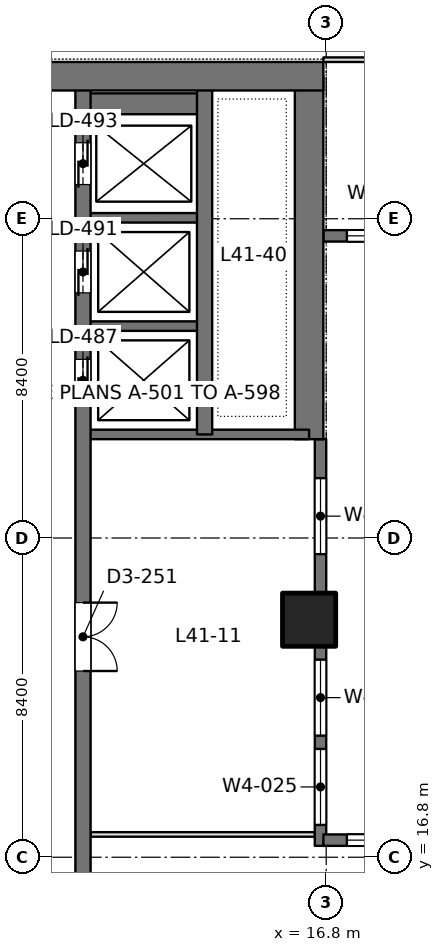
"""IFC4 building model, lengths in metres.
Left out: names, types, materials, properties, quantities, classifications, styles, units other than length and angle.
Written with IfcOpenShell. Run it as: python <this file> out.ifc"""

import sys

from ifc_helpers import new_model, si_unit, direction, frame, frame_2d, origin, origin_2d, place, context, subcontext, project, spatial, rectangle, extrude, element, fill, save


model = new_model("IFC4")
c1 = context("Model", 3, precision=1e-05, world=origin(), true_north=direction((0.0, 1.0)))
c2 = subcontext(c1, "Body", "Model", "MODEL_VIEW")
j1 = project(units=[si_unit("LENGTHUNIT", "METRE"), si_unit("PLANEANGLEUNIT", "RADIAN")], contexts=[c1])
p1 = place(None, origin())
s1 = spatial("IfcSite", under=j1, at=p1, CompositionType="ELEMENT")
p2 = place(p1, origin())
s2 = spatial("IfcBuilding", under=s1, at=p2, CompositionType="ELEMENT")
p3 = place(p2, frame((0.0, 0.0, 181.8)))
s3 = spatial("IfcBuildingStorey", under=s2, at=p3, CompositionType="ELEMENT", Elevation=181.8)
p4 = place(p3, frame((16.35, 23.05, 0.0), z_axis=(0.0, 0.0, 1.0), x_axis=(1.0, 0.0, 0.0)))
e1 = element("IfcColumn", 1, at=p4, inside=s3, PredefinedType="COLUMN", context=c2, shape_type="SweptSolid", body=[
    extrude(rectangle(XDim=1.4, YDim=1.4, at=origin_2d()), origin(), (0.0, 0.0, 1.0), 4.2),
])
p5 = place(p3, frame((-1.125, 37.35, 0.0), z_axis=(0.0, 0.0, 1.0), x_axis=(1.0, 0.0, 0.0)))
e2 = element("IfcWall", 2, at=p5, inside=s3, PredefinedType="SHEAR", context=c2, shape_type="SweptSolid", body=[
    extrude(rectangle(XDim=17.85, YDim=0.75, at=frame_2d((8.925, 0.0))), origin(), (0.0, 0.0, 1.0), 4.2),
])
p6 = place(p5, frame((8.875, 0.0, 0.0)))
e3 = element("IfcOpeningElement", 3, at=p6, cuts=e2, PredefinedType="OPENING", context=c2, shape_type="SweptSolid", body=[
    extrude(rectangle(XDim=1.8, YDim=2.4, at=frame_2d((0.9, 1.2))), frame((0.0, 0.385, 0.0), z_axis=(0.0, -1.0, 0.0), x_axis=(1.0, 0.0, 0.0)), (0.0, 0.0, 1.0), 0.77),
])
p7 = place(p3, frame((16.35, 27.8, 0.0), z_axis=(0.0, 0.0, 1.0), x_axis=(0.0, 1.0, 0.0)))
e4 = element("IfcWall", 4, at=p7, inside=s3, PredefinedType="SHEAR", context=c2, shape_type="SweptSolid", body=[
    extrude(rectangle(XDim=9.55, YDim=0.75, at=frame_2d((4.775, 0.0))), origin(), (0.0, 0.0, 1.0), 4.2),
])
p8 = place(p3, frame((10.4, 13.05, 0.0), z_axis=(0.0, 0.0, 1.0), x_axis=(0.0, 1.0, 0.0)))
e5 = element("IfcWall", 5, at=p8, inside=s3, PredefinedType="SHEAR", context=c2, shape_type="SweptSolid", body=[
    extrude(rectangle(XDim=24.3, YDim=0.4, at=frame_2d((12.15, 0.0))), origin(), (0.0, 0.0, 1.0), 4.2),
])
p9 = place(p8, frame((15.75, 0.0, 0.0)))
e6 = element("IfcOpeningElement", 6, at=p9, cuts=e5, PredefinedType="OPENING", context=c2, shape_type="SweptSolid", body=[
    extrude(rectangle(XDim=1.1, YDim=2.2, at=frame_2d((0.55, 1.1))), frame((0.0, 0.21, 0.0), z_axis=(0.0, -1.0, 0.0), x_axis=(1.0, 0.0, 0.0)), (0.0, 0.0, 1.0), 0.42),
])
p10 = place(p8, frame((18.6, 0.0, 0.0)))
e7 = element("IfcOpeningElement", 7, at=p10, cuts=e5, PredefinedType="OPENING", context=c2, shape_type="SweptSolid", body=[
    extrude(rectangle(XDim=1.1, YDim=2.2, at=frame_2d((0.55, 1.1))), frame((0.0, 0.21, 0.0), z_axis=(0.0, -1.0, 0.0), x_axis=(1.0, 0.0, 0.0)), (0.0, 0.0, 1.0), 0.42),
])
p11 = place(p8, frame((21.45, 0.0, 0.0)))
e8 = element("IfcOpeningElement", 8, at=p11, cuts=e5, PredefinedType="OPENING", context=c2, shape_type="SweptSolid", body=[
    extrude(rectangle(XDim=1.1, YDim=2.2, at=frame_2d((0.55, 1.1))), frame((0.0, 0.21, 0.0), z_axis=(0.0, -1.0, 0.0), x_axis=(1.0, 0.0, 0.0)), (0.0, 0.0, 1.0), 0.42),
])
p12 = place(p8, frame((8.65, 0.0, 0.0)))
e9 = element("IfcOpeningElement", 9, at=p12, cuts=e5, PredefinedType="OPENING", context=c2, shape_type="SweptSolid", body=[
    extrude(rectangle(XDim=1.8, YDim=2.4, at=frame_2d((0.9, 1.2))), frame((0.0, 0.21, 0.0), z_axis=(0.0, -1.0, 0.0), x_axis=(1.0, 0.0, 0.0)), (0.0, 0.0, 1.0), 0.42),
])
p13 = place(p3, frame((13.6, 27.925, 0.0), z_axis=(0.0, 0.0, 1.0), x_axis=(0.0, 1.0, 0.0)))
e10 = element("IfcWall", 10, at=p13, inside=s3, PredefinedType="SHEAR", context=c2, shape_type="SweptSolid", body=[
    extrude(rectangle(XDim=9.425, YDim=0.4, at=frame_2d((4.712, 0.0))), origin(), (0.0, 0.0, 1.0), 4.2),
])
p14 = place(p3, frame((10.4, 27.925, 0.0), z_axis=(0.0, 0.0, 1.0), x_axis=(1.0, 0.0, 0.0)))
e11 = element("IfcWall", 11, at=p14, inside=s3, PredefinedType="SHEAR", context=c2, shape_type="SweptSolid", body=[
    extrude(rectangle(XDim=5.95, YDim=0.25, at=frame_2d((2.975, 0.0))), origin(), (0.0, 0.0, 1.0), 4.2),
])
for number, where, z_axis, x_axis in (
    (12, (10.4, 30.775, 0.0), (0.0, 0.0, 1.0), (1.0, 0.0, 0.0)),
    (13, (10.4, 33.625, 0.0), (0.0, 0.0, 1.0), (1.0, 0.0, 0.0)),
):
    element("IfcWall", number, at=place(p3, frame(where, z_axis=z_axis, x_axis=x_axis)), inside=s3, PredefinedType="SHEAR", context=c2, shape_type="SweptSolid", body=[
        extrude(rectangle(XDim=3.2, YDim=0.25, at=frame_2d((1.6, 0.0))), origin(), (0.0, 0.0, 1.0), 4.2),
    ])
p15 = place(p3, frame((10.4, 36.625, 0.0), z_axis=(0.0, 0.0, 1.0), x_axis=(1.0, 0.0, 0.0)))
e14 = element("IfcWall", 14, at=p15, inside=s3, PredefinedType="SHEAR", context=c2, shape_type="SweptSolid", body=[
    extrude(rectangle(XDim=3.2, YDim=0.55, at=frame_2d((1.6, 0.0))), origin(), (0.0, 0.0, 1.0), 4.2),
])
p16 = place(p3, frame((16.65, 17.1, 0.0), z_axis=(0.0, 0.0, 1.0), x_axis=(0.0, 1.0, 0.0)))
e15 = element("IfcWall", 15, at=p16, inside=s3, PredefinedType="SOLIDWALL", context=c2, shape_type="SweptSolid", body=[
    extrude(rectangle(XDim=10.7, YDim=0.3, at=frame_2d((5.35, 0.0))), origin(), (0.0, 0.0, 1.0), 4.05),
])
p17 = place(p16, frame((0.55, 0.0, 0.9)))
e16 = element("IfcOpeningElement", 16, at=p17, cuts=e15, PredefinedType="OPENING", context=c2, shape_type="SweptSolid", body=[
    extrude(rectangle(XDim=2.0, YDim=1.9, at=frame_2d((1.0, 0.95))), frame((0.0, 0.16, 0.0), z_axis=(0.0, -1.0, 0.0), x_axis=(1.0, 0.0, 0.0)), (0.0, 0.0, 1.0), 0.32),
])
p18 = place(p16, frame((2.9, 0.0, 0.9)))
e17 = element("IfcOpeningElement", 17, at=p18, cuts=e15, PredefinedType="OPENING", context=c2, shape_type="SweptSolid", body=[
    extrude(rectangle(XDim=2.0, YDim=1.9, at=frame_2d((1.0, 0.95))), frame((0.0, 0.16, 0.0), z_axis=(0.0, -1.0, 0.0), x_axis=(1.0, 0.0, 0.0)), (0.0, 0.0, 1.0), 0.32),
])
p19 = place(p16, frame((7.675, 0.0, 0.9)))
e18 = element("IfcOpeningElement", 18, at=p19, cuts=e15, PredefinedType="OPENING", context=c2, shape_type="SweptSolid", body=[
    extrude(rectangle(XDim=2.0, YDim=1.9, at=frame_2d((1.0, 0.95))), frame((0.0, 0.16, 0.0), z_axis=(0.0, -1.0, 0.0), x_axis=(1.0, 0.0, 0.0)), (0.0, 0.0, 1.0), 0.32),
])
p20 = place(p3, frame((16.725, 17.25, 0.0), z_axis=(0.0, 0.0, 1.0), x_axis=(1.0, 0.0, 0.0)))
e19 = element("IfcWall", 19, at=p20, inside=s3, PredefinedType="SOLIDWALL", context=c2, shape_type="SweptSolid", body=[
    extrude(rectangle(XDim=7.925, YDim=0.3, at=frame_2d((3.962, 0.0))), origin(), (0.0, 0.0, 1.0), 4.05),
])
p21 = place(p20, frame((0.619, 0.0, 0.9)))
e20 = element("IfcOpeningElement", 20, at=p21, cuts=e19, PredefinedType="OPENING", context=c2, shape_type="SweptSolid", body=[
    extrude(rectangle(XDim=2.0, YDim=1.9, at=frame_2d((1.0, 0.95))), frame((0.0, 0.16, 0.0), z_axis=(0.0, -1.0, 0.0), x_axis=(1.0, 0.0, 0.0)), (0.0, 0.0, 1.0), 0.32),
])
p22 = place(p20, frame((3.238, 0.0, 0.9)))
e21 = element("IfcOpeningElement", 21, at=p22, cuts=e19, PredefinedType="OPENING", context=c2, shape_type="SweptSolid", body=[
    extrude(rectangle(XDim=2.0, YDim=1.9, at=frame_2d((1.0, 0.95))), frame((0.0, 0.16, 0.0), z_axis=(0.0, -1.0, 0.0), x_axis=(1.0, 0.0, 0.0)), (0.0, 0.0, 1.0), 0.32),
])
p23 = place(p20, frame((5.856, 0.0, 0.9)))
e22 = element("IfcOpeningElement", 22, at=p23, cuts=e19, PredefinedType="OPENING", context=c2, shape_type="SweptSolid", body=[
    extrude(rectangle(XDim=2.0, YDim=1.9, at=frame_2d((1.0, 0.95))), frame((0.0, 0.16, 0.0), z_axis=(0.0, -1.0, 0.0), x_axis=(1.0, 0.0, 0.0)), (0.0, 0.0, 1.0), 0.32),
])
p24 = place(p3, frame((16.725, 33.15, 0.0), z_axis=(0.0, 0.0, 1.0), x_axis=(1.0, 0.0, 0.0)))
e23 = element("IfcWall", 23, at=p24, inside=s3, PredefinedType="SOLIDWALL", context=c2, shape_type="SweptSolid", body=[
    extrude(rectangle(XDim=7.925, YDim=0.3, at=frame_2d((3.962, 0.0))), origin(), (0.0, 0.0, 1.0), 4.05),
])
p25 = place(p24, frame((0.619, 0.0, 0.9)))
e24 = element("IfcOpeningElement", 24, at=p25, cuts=e23, PredefinedType="OPENING", context=c2, shape_type="SweptSolid", body=[
    extrude(rectangle(XDim=2.0, YDim=1.9, at=frame_2d((1.0, 0.95))), frame((0.0, 0.16, 0.0), z_axis=(0.0, -1.0, 0.0), x_axis=(1.0, 0.0, 0.0)), (0.0, 0.0, 1.0), 0.32),
])
p26 = place(p24, frame((3.238, 0.0, 0.9)))
e25 = element("IfcOpeningElement", 25, at=p26, cuts=e23, PredefinedType="OPENING", context=c2, shape_type="SweptSolid", body=[
    extrude(rectangle(XDim=2.0, YDim=1.9, at=frame_2d((1.0, 0.95))), frame((0.0, 0.16, 0.0), z_axis=(0.0, -1.0, 0.0), x_axis=(1.0, 0.0, 0.0)), (0.0, 0.0, 1.0), 0.32),
])
p27 = place(p24, frame((5.856, 0.0, 0.9)))
e26 = element("IfcOpeningElement", 26, at=p27, cuts=e23, PredefinedType="OPENING", context=c2, shape_type="SweptSolid", body=[
    extrude(rectangle(XDim=2.0, YDim=1.9, at=frame_2d((1.0, 0.95))), frame((0.0, 0.16, 0.0), z_axis=(0.0, -1.0, 0.0), x_axis=(1.0, 0.0, 0.0)), (0.0, 0.0, 1.0), 0.32),
])
p28 = place(p3, frame((10.598, 17.4, 0.0), z_axis=(0.0, 0.0, 1.0), x_axis=(1.0, 0.0, 0.0)))
e27 = element("IfcWall", 27, at=p28, inside=s3, PredefinedType="PARTITIONING", context=c2, shape_type="SweptSolid", body=[
    extrude(rectangle(XDim=5.904, YDim=0.12, at=frame_2d((2.952, 0.0))), origin(), (0.0, 0.0, 1.0), 3.55),
])
p29 = place(p3, frame((16.725, 37.785, 0.0), z_axis=(0.0, 0.0, 1.0), x_axis=(1.0, 0.0, 0.0)))
e28 = element("IfcWall", 28, at=p29, inside=s3, PredefinedType="PARTITIONING", context=c2, shape_type="SweptSolid", body=[
    extrude(rectangle(XDim=16.95, YDim=0.12, at=frame_2d((8.475, 0.0))), origin(), (0.0, 0.0, 1.0), 3.55),
])
p30 = place(p29, frame((7.575, 0.0, 0.0)))
e29 = element("IfcOpeningElement", 29, at=p30, cuts=e28, PredefinedType="OPENING", context=c2, shape_type="SweptSolid", body=[
    extrude(rectangle(XDim=1.8, YDim=2.2, at=frame_2d((0.9, 1.1))), frame((0.0, 0.07, 0.0), z_axis=(0.0, -1.0, 0.0), x_axis=(1.0, 0.0, 0.0)), (0.0, 0.0, 1.0), 0.14),
])
p31 = place(p17, origin())
e30 = element("IfcWindow", 30, at=p31, inside=s3, PartitioningType="SINGLE_PANEL", PredefinedType="WINDOW", context=c2, shape_type="SweptSolid", body=[
    extrude(rectangle(XDim=2.0, YDim=1.9, at=frame_2d((1.0, 0.95))), frame((0.0, 0.03, 0.0), z_axis=(0.0, -1.0, 0.0), x_axis=(1.0, 0.0, 0.0)), (0.0, 0.0, 1.0), 0.06),
])
fill(e16, e30)
p32 = place(p18, origin())
e31 = element("IfcWindow", 31, at=p32, inside=s3, PartitioningType="SINGLE_PANEL", PredefinedType="WINDOW", context=c2, shape_type="SweptSolid", body=[
    extrude(rectangle(XDim=2.0, YDim=1.9, at=frame_2d((1.0, 0.95))), frame((0.0, 0.03, 0.0), z_axis=(0.0, -1.0, 0.0), x_axis=(1.0, 0.0, 0.0)), (0.0, 0.0, 1.0), 0.06),
])
fill(e17, e31)
p33 = place(p19, origin())
e32 = element("IfcWindow", 32, at=p33, inside=s3, PartitioningType="SINGLE_PANEL", PredefinedType="WINDOW", context=c2, shape_type="SweptSolid", body=[
    extrude(rectangle(XDim=2.0, YDim=1.9, at=frame_2d((1.0, 0.95))), frame((0.0, 0.03, 0.0), z_axis=(0.0, -1.0, 0.0), x_axis=(1.0, 0.0, 0.0)), (0.0, 0.0, 1.0), 0.06),
])
fill(e18, e32)
p34 = place(p21, origin())
e33 = element("IfcWindow", 33, at=p34, inside=s3, PartitioningType="SINGLE_PANEL", PredefinedType="WINDOW", context=c2, shape_type="SweptSolid", body=[
    extrude(rectangle(XDim=2.0, YDim=1.9, at=frame_2d((1.0, 0.95))), frame((0.0, 0.03, 0.0), z_axis=(0.0, -1.0, 0.0), x_axis=(1.0, 0.0, 0.0)), (0.0, 0.0, 1.0), 0.06),
])
fill(e20, e33)
p35 = place(p25, origin())
e34 = element("IfcWindow", 34, at=p35, inside=s3, PartitioningType="SINGLE_PANEL", PredefinedType="WINDOW", context=c2, shape_type="SweptSolid", body=[
    extrude(rectangle(XDim=2.0, YDim=1.9, at=frame_2d((1.0, 0.95))), frame((0.0, 0.03, 0.0), z_axis=(0.0, -1.0, 0.0), x_axis=(1.0, 0.0, 0.0)), (0.0, 0.0, 1.0), 0.06),
])
fill(e24, e34)
p36 = place(p9, origin())
e35 = element("IfcDoor", 35, at=p36, inside=s3, OperationType="DOUBLE_DOOR_SLIDING", PredefinedType="DOOR", context=c2, shape_type="SweptSolid", body=[
    extrude(rectangle(XDim=1.1, YDim=2.2, at=frame_2d((0.55, 1.1))), frame((0.0, 0.025, 0.0), z_axis=(0.0, -1.0, 0.0), x_axis=(1.0, 0.0, 0.0)), (0.0, 0.0, 1.0), 0.05),
])
fill(e6, e35)
p37 = place(p10, origin())
e36 = element("IfcDoor", 36, at=p37, inside=s3, OperationType="DOUBLE_DOOR_SLIDING", PredefinedType="DOOR", context=c2, shape_type="SweptSolid", body=[
    extrude(rectangle(XDim=1.1, YDim=2.2, at=frame_2d((0.55, 1.1))), frame((0.0, 0.025, 0.0), z_axis=(0.0, -1.0, 0.0), x_axis=(1.0, 0.0, 0.0)), (0.0, 0.0, 1.0), 0.05),
])
fill(e7, e36)
p38 = place(p11, origin())
e37 = element("IfcDoor", 37, at=p38, inside=s3, OperationType="DOUBLE_DOOR_SLIDING", PredefinedType="DOOR", context=c2, shape_type="SweptSolid", body=[
    extrude(rectangle(XDim=1.1, YDim=2.2, at=frame_2d((0.55, 1.1))), frame((0.0, 0.025, 0.0), z_axis=(0.0, -1.0, 0.0), x_axis=(1.0, 0.0, 0.0)), (0.0, 0.0, 1.0), 0.05),
])
fill(e8, e37)
p39 = place(p12, frame((1.8, 0.0, 0.0), z_axis=(0.0, 0.0, 1.0), x_axis=(-1.0, 0.0, 0.0)))
e38 = element("IfcDoor", 38, at=p39, inside=s3, OperationType="DOUBLE_DOOR_SINGLE_SWING", PredefinedType="DOOR", context=c2, shape_type="SweptSolid", body=[
    extrude(rectangle(XDim=1.8, YDim=2.4, at=frame_2d((0.9, 1.2))), frame((0.0, 0.025, 0.0), z_axis=(0.0, -1.0, 0.0), x_axis=(1.0, 0.0, 0.0)), (0.0, 0.0, 1.0), 0.05),
])
fill(e9, e38)
save(model, sys.argv[1])
